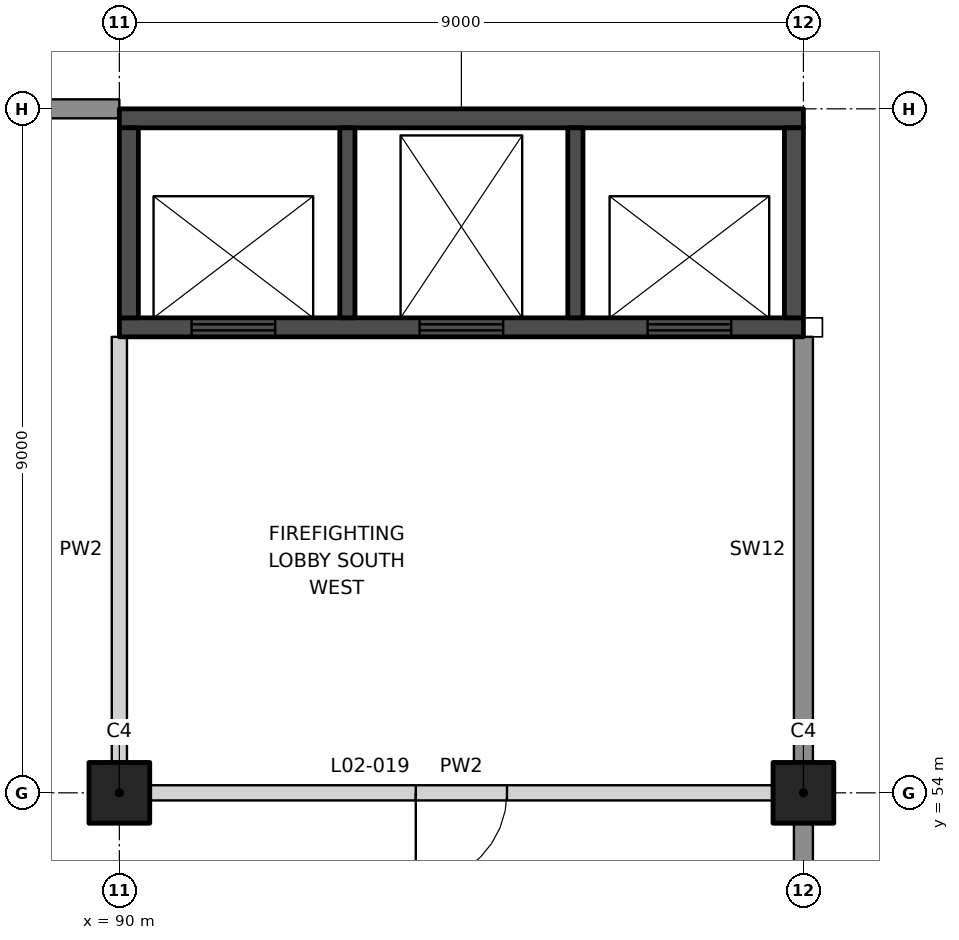
"""IFC4 building model, lengths in metres.
Left out: names, types, materials, properties, quantities, classifications, styles, units other than length and angle.
Written with IfcOpenShell. Run it as: python <this file> out.ifc"""

import sys

from ifc_helpers import new_model, si_unit, direction, frame, frame_2d, origin, origin_2d, place, context, subcontext, project, spatial, rectangle, extrude, element, fill, save


model = new_model("IFC4")
c1 = context("Model", 3, precision=1e-05, world=origin(), true_north=direction((0.0, 1.0)))
c2 = subcontext(c1, "Body", "Model", "MODEL_VIEW")
j1 = project(units=[si_unit("LENGTHUNIT", "METRE"), si_unit("PLANEANGLEUNIT", "RADIAN")], contexts=[c1])
p1 = place(None, origin())
s1 = spatial("IfcSite", under=j1, at=p1, CompositionType="ELEMENT")
p2 = place(p1, origin())
s2 = spatial("IfcBuilding", under=s1, at=p2, CompositionType="ELEMENT")
p3 = place(p2, frame((0.0, 0.0, 11.5)))
s3 = spatial("IfcBuildingStorey", under=s2, at=p3, CompositionType="ELEMENT", Elevation=11.5)
for number, where, z_axis, x_axis in (
    (1, (90.0, 54.0, 0.0), (0.0, 0.0, 1.0), (1.0, 0.0, 0.0)),
    (2, (99.0, 54.0, 0.0), (0.0, 0.0, 1.0), (1.0, 0.0, 0.0)),
):
    element("IfcColumn", number, at=place(p3, frame(where, z_axis=z_axis, x_axis=x_axis)), inside=s3, PredefinedType="COLUMN", context=c2, shape_type="SweptSolid", body=[
        extrude(rectangle(XDim=0.8, YDim=0.8, at=origin_2d()), origin(), (0.0, 0.0, 1.0), 10.5),
    ])
p4 = place(p3, frame((90.4, 54.0, 0.0), z_axis=(0.0, 0.0, 1.0), x_axis=(1.0, 0.0, 0.0)))
e3 = element("IfcWall", 3, at=p4, inside=s3, PredefinedType="PARTITIONING", context=c2, shape_type="SweptSolid", body=[
    extrude(rectangle(XDim=8.2, YDim=0.2, at=frame_2d((4.1, 0.0))), origin(), (0.0, 0.0, 1.0), 9.25),
])
p5 = place(p4, frame((3.5, 0.0, 0.0)))
e4 = element("IfcOpeningElement", 4, at=p5, cuts=e3, PredefinedType="OPENING", context=c2, shape_type="SweptSolid", body=[
    extrude(rectangle(XDim=1.2, YDim=2.1, at=frame_2d((0.6, 1.05))), frame((0.0, 0.11, 0.0), z_axis=(0.0, -1.0, 0.0), x_axis=(1.0, 0.0, 0.0)), (0.0, 0.0, 1.0), 0.22),
])
p6 = place(p3, frame((90.0, 54.4, 0.0), z_axis=(0.0, 0.0, 1.0), x_axis=(0.0, 1.0, 0.0)))
e5 = element("IfcWall", 5, at=p6, inside=s3, PredefinedType="PARTITIONING", context=c2, shape_type="SweptSolid", body=[
    extrude(rectangle(XDim=5.6, YDim=0.2, at=frame_2d((2.8, 0.0))), origin(), (0.0, 0.0, 1.0), 9.45),
])
p7 = place(p3, frame((90.0, 60.125, 0.0), z_axis=(0.0, 0.0, 1.0), x_axis=(1.0, 0.0, 0.0)))
e6 = element("IfcWall", 6, at=p7, inside=s3, PredefinedType="SHEAR", context=c2, shape_type="SweptSolid", body=[
    extrude(rectangle(XDim=9.0, YDim=0.25, at=frame_2d((4.5, 0.0))), origin(), (0.0, 0.0, 1.0), 10.5),
])
p8 = place(p7, frame((0.95, 0.0, 0.0)))
e7 = element("IfcOpeningElement", 7, at=p8, cuts=e6, PredefinedType="OPENING", context=c2, shape_type="SweptSolid", body=[
    extrude(rectangle(XDim=1.1, YDim=2.1, at=frame_2d((0.55, 1.05))), frame((0.0, 0.135, 0.0), z_axis=(0.0, -1.0, 0.0), x_axis=(1.0, 0.0, 0.0)), (0.0, 0.0, 1.0), 0.27),
])
p9 = place(p7, frame((3.95, 0.0, 0.0)))
e8 = element("IfcOpeningElement", 8, at=p9, cuts=e6, PredefinedType="OPENING", context=c2, shape_type="SweptSolid", body=[
    extrude(rectangle(XDim=1.1, YDim=2.1, at=frame_2d((0.55, 1.05))), frame((0.0, 0.135, 0.0), z_axis=(0.0, -1.0, 0.0), x_axis=(1.0, 0.0, 0.0)), (0.0, 0.0, 1.0), 0.27),
])
p10 = place(p7, frame((6.95, 0.0, 0.0)))
e9 = element("IfcOpeningElement", 9, at=p10, cuts=e6, PredefinedType="OPENING", context=c2, shape_type="SweptSolid", body=[
    extrude(rectangle(XDim=1.1, YDim=2.1, at=frame_2d((0.55, 1.05))), frame((0.0, 0.135, 0.0), z_axis=(0.0, -1.0, 0.0), x_axis=(1.0, 0.0, 0.0)), (0.0, 0.0, 1.0), 0.27),
])
p11 = place(p3, frame((90.0, 62.875, 0.0), z_axis=(0.0, 0.0, 1.0), x_axis=(1.0, 0.0, 0.0)))
e10 = element("IfcWall", 10, at=p11, inside=s3, PredefinedType="SHEAR", context=c2, shape_type="SweptSolid", body=[
    extrude(rectangle(XDim=9.0, YDim=0.25, at=frame_2d((4.5, 0.0))), origin(), (0.0, 0.0, 1.0), 10.5),
])
for number, where, z_axis, x_axis in (
    (11, (90.125, 60.25, 0.0), (0.0, 0.0, 1.0), (0.0, 1.0, 0.0)),
    (12, (98.875, 60.25, 0.0), (0.0, 0.0, 1.0), (0.0, 1.0, 0.0)),
):
    element("IfcWall", number, at=place(p3, frame(where, z_axis=z_axis, x_axis=x_axis)), inside=s3, PredefinedType="SHEAR", context=c2, shape_type="SweptSolid", body=[
        extrude(rectangle(XDim=2.5, YDim=0.25, at=frame_2d((1.25, 0.0))), origin(), (0.0, 0.0, 1.0), 10.5),
    ])
for number, where, z_axis, x_axis in (
    (13, (93.0, 60.25, 0.0), (0.0, 0.0, 1.0), (0.0, 1.0, 0.0)),
    (14, (96.0, 60.25, 0.0), (0.0, 0.0, 1.0), (0.0, 1.0, 0.0)),
):
    element("IfcWall", number, at=place(p3, frame(where, z_axis=z_axis, x_axis=x_axis)), inside=s3, PredefinedType="SHEAR", context=c2, shape_type="SweptSolid", body=[
        extrude(rectangle(XDim=2.5, YDim=0.2, at=frame_2d((1.25, 0.0))), origin(), (0.0, 0.0, 1.0), 10.5),
    ])
p12 = place(p3, frame((99.0, 50.5, 0.0), z_axis=(0.0, 0.0, 1.0), x_axis=(0.0, 1.0, 0.0)))
e15 = element("IfcWall", 15, at=p12, inside=s3, PredefinedType="SOLIDWALL", context=c2, shape_type="SweptSolid", body=[
    extrude(rectangle(XDim=3.1, YDim=0.25, at=frame_2d((1.55, 0.0))), origin(), (0.0, 0.0, 1.0), 9.25),
])
p13 = place(p3, frame((99.0, 54.4, 0.0), z_axis=(0.0, 0.0, 1.0), x_axis=(0.0, 1.0, 0.0)))
e16 = element("IfcWall", 16, at=p13, inside=s3, PredefinedType="SOLIDWALL", context=c2, shape_type="SweptSolid", body=[
    extrude(rectangle(XDim=5.6, YDim=0.25, at=frame_2d((2.8, 0.0))), origin(), (0.0, 0.0, 1.0), 9.45),
])
p14 = place(p3, frame((86.5, 63.0, 0.0), z_axis=(0.0, 0.0, 1.0), x_axis=(1.0, 0.0, 0.0)))
e17 = element("IfcWall", 17, at=p14, inside=s3, PredefinedType="SOLIDWALL", context=c2, shape_type="SweptSolid", body=[
    extrude(rectangle(XDim=3.5, YDim=0.25, at=frame_2d((1.75, 0.0))), origin(), (0.0, 0.0, 1.0), 9.15),
])
p15 = place(p5, frame((1.2, 0.0, 0.0), z_axis=(0.0, 0.0, 1.0), x_axis=(-1.0, 0.0, 0.0)))
e18 = element("IfcDoor", 18, at=p15, inside=s3, OperationType="SINGLE_SWING_RIGHT", PredefinedType="DOOR", context=c2, shape_type="SweptSolid", body=[
    extrude(rectangle(XDim=1.2, YDim=2.1, at=frame_2d((0.6, 1.05))), frame((0.0, 0.025, 0.0), z_axis=(0.0, -1.0, 0.0), x_axis=(1.0, 0.0, 0.0)), (0.0, 0.0, 1.0), 0.05),
])
fill(e4, e18)
p16 = place(p8, origin())
e19 = element("IfcDoor", 19, at=p16, inside=s3, OperationType="DOUBLE_DOOR_SLIDING", PredefinedType="DOOR", context=c2, shape_type="SweptSolid", body=[
    extrude(rectangle(XDim=1.1, YDim=2.1, at=frame_2d((0.55, 1.05))), frame((0.0, 0.025, 0.0), z_axis=(0.0, -1.0, 0.0), x_axis=(1.0, 0.0, 0.0)), (0.0, 0.0, 1.0), 0.05),
])
fill(e7, e19)
p17 = place(p9, origin())
e20 = element("IfcDoor", 20, at=p17, inside=s3, OperationType="DOUBLE_DOOR_SLIDING", PredefinedType="DOOR", context=c2, shape_type="SweptSolid", body=[
    extrude(rectangle(XDim=1.1, YDim=2.1, at=frame_2d((0.55, 1.05))), frame((0.0, 0.025, 0.0), z_axis=(0.0, -1.0, 0.0), x_axis=(1.0, 0.0, 0.0)), (0.0, 0.0, 1.0), 0.05),
])
fill(e8, e20)
p18 = place(p10, origin())
e21 = element("IfcDoor", 21, at=p18, inside=s3, OperationType="DOUBLE_DOOR_SLIDING", PredefinedType="DOOR", context=c2, shape_type="SweptSolid", body=[
    extrude(rectangle(XDim=1.1, YDim=2.1, at=frame_2d((0.55, 1.05))), frame((0.0, 0.025, 0.0), z_axis=(0.0, -1.0, 0.0), x_axis=(1.0, 0.0, 0.0)), (0.0, 0.0, 1.0), 0.05),
])
fill(e9, e21)
save(model, sys.argv[1])
